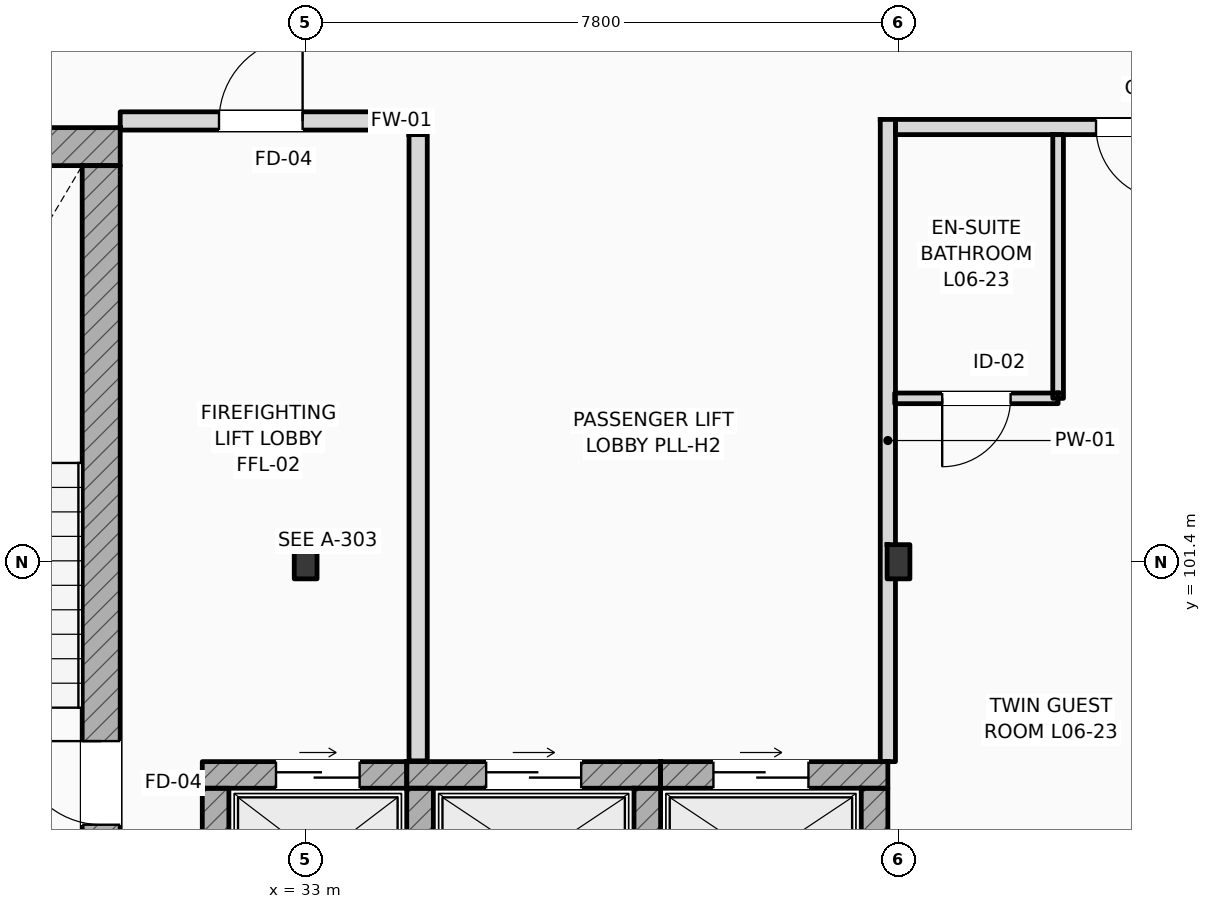
"""IFC4 building model, lengths in metres.
Left out: names, types, materials, properties, quantities, classifications, styles, units other than length and angle.
Written with IfcOpenShell. Run it as: python <this file> out.ifc"""

import sys

from ifc_helpers import new_model, si_unit, direction, frame, frame_2d, origin, origin_2d, place, context, subcontext, project, spatial, rectangle, i_section, extrude, element, fill, save


model = new_model("IFC4")
c1 = context("Model", 3, precision=1e-05, world=origin(), true_north=direction((0.0, 1.0)))
c2 = subcontext(c1, "Body", "Model", "MODEL_VIEW")
j1 = project(units=[si_unit("LENGTHUNIT", "METRE"), si_unit("PLANEANGLEUNIT", "RADIAN")], contexts=[c1])
p1 = place(None, origin())
s1 = spatial("IfcSite", under=j1, at=p1, CompositionType="ELEMENT")
p2 = place(p1, origin())
s2 = spatial("IfcBuilding", under=s1, at=p2, CompositionType="ELEMENT")
p3 = place(p2, frame((0.0, 0.0, 28.2)))
s3 = spatial("IfcBuildingStorey", under=s2, at=p3, CompositionType="ELEMENT", Elevation=28.2)
for number, where, z_axis, x_axis in (
    (1, (33.0, 101.4, 0.0), (0.0, 0.0, 1.0), (1.0, 0.0, 0.0)),
    (2, (40.8, 101.4, 0.0), (0.0, 0.0, 1.0), (1.0, 0.0, 0.0)),
):
    element("IfcColumn", number, at=place(p3, frame(where, z_axis=z_axis, x_axis=x_axis)), inside=s3, PredefinedType="COLUMN", context=c2, shape_type="SweptSolid", body=[
        extrude(i_section(OverallWidth=0.3, OverallDepth=0.45, WebThickness=0.014, FlangeThickness=0.026, FilletRadius=0.027, at=origin_2d()), origin(), (0.0, 0.0, 1.0), 3.6),
    ])
p4 = place(p3, frame((25.4, 106.862, 0.0), z_axis=(0.0, 0.0, 1.0), x_axis=(1.0, 0.0, 0.0)))
e3 = element("IfcWall", 3, at=p4, inside=s3, PredefinedType="SHEAR", context=c2, shape_type="SweptSolid", body=[
    extrude(rectangle(XDim=5.16, YDim=0.5, at=frame_2d((2.58, 0.0))), origin(), (0.0, 0.0, 1.0), 3.6),
])
p5 = place(p3, frame((30.31, 97.5, 0.0), z_axis=(0.0, 0.0, 1.0), x_axis=(0.0, 1.0, 0.0)))
e4 = element("IfcWall", 4, at=p5, inside=s3, PredefinedType="SHEAR", context=c2, shape_type="SweptSolid", body=[
    extrude(rectangle(XDim=9.112, YDim=0.5, at=frame_2d((4.556, 0.0))), origin(), (0.0, 0.0, 1.0), 3.6),
])
p6 = place(p5, frame((0.44, 0.0, 0.0)))
e5 = element("IfcOpeningElement", 5, at=p6, cuts=e4, PredefinedType="OPENING", context=c2, shape_type="SweptSolid", body=[
    extrude(rectangle(XDim=1.1, YDim=2.2, at=frame_2d((0.55, 1.1))), frame((0.0, 0.26, 0.0), z_axis=(0.0, -1.0, 0.0), x_axis=(1.0, 0.0, 0.0)), (0.0, 0.0, 1.0), 0.52),
])
p7 = place(p3, frame((31.64, 98.595, 0.0), z_axis=(0.0, 0.0, 1.0), x_axis=(1.0, 0.0, 0.0)))
e6 = element("IfcWall", 6, at=p7, inside=s3, PredefinedType="SHEAR", context=c2, shape_type="SweptSolid", body=[
    extrude(rectangle(XDim=2.69, YDim=0.35, at=frame_2d((1.345, 0.0))), origin(), (0.0, 0.0, 1.0), 3.36),
])
p8 = place(p7, frame((0.97, 0.0, 0.0)))
e7 = element("IfcOpeningElement", 7, at=p8, cuts=e6, PredefinedType="OPENING", context=c2, shape_type="SweptSolid", body=[
    extrude(rectangle(XDim=1.1, YDim=2.2, at=frame_2d((0.55, 1.1))), frame((0.0, 0.185, 0.0), z_axis=(0.0, -1.0, 0.0), x_axis=(1.0, 0.0, 0.0)), (0.0, 0.0, 1.0), 0.37),
])
p9 = place(p3, frame((31.815, 96.58, 0.0), z_axis=(0.0, 0.0, 1.0), x_axis=(0.0, 1.0, 0.0)))
e8 = element("IfcWall", 8, at=p9, inside=s3, PredefinedType="SHEAR", context=c2, shape_type="SweptSolid", body=[
    extrude(rectangle(XDim=1.84, YDim=0.35, at=frame_2d((0.92, 0.0))), origin(), (0.0, 0.0, 1.0), 3.36),
])
p10 = place(p3, frame((34.33, 98.595, 0.0), z_axis=(0.0, 0.0, 1.0), x_axis=(1.0, 0.0, 0.0)))
e9 = element("IfcWall", 9, at=p10, inside=s3, PredefinedType="SHEAR", context=c2, shape_type="SweptSolid", body=[
    extrude(rectangle(XDim=3.34, YDim=0.35, at=frame_2d((1.67, 0.0))), origin(), (0.0, 0.0, 1.0), 3.36),
])
p11 = place(p10, frame((1.045, 0.0, 0.0)))
e10 = element("IfcOpeningElement", 10, at=p11, cuts=e9, PredefinedType="OPENING", context=c2, shape_type="SweptSolid", body=[
    extrude(rectangle(XDim=1.25, YDim=2.25, at=frame_2d((0.625, 1.125))), frame((0.0, 0.185, 0.0), z_axis=(0.0, -1.0, 0.0), x_axis=(1.0, 0.0, 0.0)), (0.0, 0.0, 1.0), 0.37),
])
for number, where, z_axis, x_axis in (
    (11, (34.505, 96.58, 0.0), (0.0, 0.0, 1.0), (0.0, 1.0, 0.0)),
    (12, (37.495, 96.58, 0.0), (0.0, 0.0, 1.0), (0.0, 1.0, 0.0)),
):
    element("IfcWall", number, at=place(p3, frame(where, z_axis=z_axis, x_axis=x_axis)), inside=s3, PredefinedType="SHEAR", context=c2, shape_type="SweptSolid", body=[
        extrude(rectangle(XDim=1.84, YDim=0.35, at=frame_2d((0.92, 0.0))), origin(), (0.0, 0.0, 1.0), 3.36),
    ])
p12 = place(p3, frame((37.67, 98.595, 0.0), z_axis=(0.0, 0.0, 1.0), x_axis=(1.0, 0.0, 0.0)))
e13 = element("IfcWall", 13, at=p12, inside=s3, PredefinedType="SHEAR", context=c2, shape_type="SweptSolid", body=[
    extrude(rectangle(XDim=2.99, YDim=0.35, at=frame_2d((1.495, 0.0))), origin(), (0.0, 0.0, 1.0), 3.36),
])
p13 = place(p12, frame((0.695, 0.0, 0.0)))
e14 = element("IfcOpeningElement", 14, at=p13, cuts=e13, PredefinedType="OPENING", context=c2, shape_type="SweptSolid", body=[
    extrude(rectangle(XDim=1.25, YDim=2.25, at=frame_2d((0.625, 1.125))), frame((0.0, 0.185, 0.0), z_axis=(0.0, -1.0, 0.0), x_axis=(1.0, 0.0, 0.0)), (0.0, 0.0, 1.0), 0.37),
])
p14 = place(p3, frame((40.485, 96.58, 0.0), z_axis=(0.0, 0.0, 1.0), x_axis=(0.0, 1.0, 0.0)))
e15 = element("IfcWall", 15, at=p14, inside=s3, PredefinedType="SHEAR", context=c2, shape_type="SweptSolid", body=[
    extrude(rectangle(XDim=1.84, YDim=0.35, at=frame_2d((0.92, 0.0))), origin(), (0.0, 0.0, 1.0), 2.99),
])
p15 = place(p3, frame((34.48, 98.78, 0.0), z_axis=(0.0, 0.0, 1.0), x_axis=(0.0, 1.0, 0.0)))
e16 = element("IfcWall", 16, at=p15, inside=s3, PredefinedType="STANDARD", context=c2, shape_type="SweptSolid", body=[
    extrude(rectangle(XDim=8.24, YDim=0.24, at=frame_2d((4.12, 0.0))), origin(), (0.0, 0.0, 1.0), 3.36),
])
p16 = place(p3, frame((30.56, 107.2, 0.0), z_axis=(0.0, 0.0, 1.0), x_axis=(1.0, 0.0, 0.0)))
e17 = element("IfcWall", 17, at=p16, inside=s3, PredefinedType="STANDARD", context=c2, shape_type="SweptSolid", body=[
    extrude(rectangle(XDim=4.1, YDim=0.24, at=frame_2d((2.05, 0.0))), origin(), (0.0, 0.0, 1.0), 3.36),
])
p17 = place(p16, frame((1.3, 0.0, 0.0)))
e18 = element("IfcOpeningElement", 18, at=p17, cuts=e17, PredefinedType="OPENING", context=c2, shape_type="SweptSolid", body=[
    extrude(rectangle(XDim=1.1, YDim=2.2, at=frame_2d((0.55, 1.1))), frame((0.0, 0.13, 0.0), z_axis=(0.0, -1.0, 0.0), x_axis=(1.0, 0.0, 0.0)), (0.0, 0.0, 1.0), 0.26),
])
p18 = place(p3, frame((40.76, 107.12, 0.0), z_axis=(0.0, 0.0, 1.0), x_axis=(1.0, 0.0, 0.0)))
e19 = element("IfcWall", 19, at=p18, inside=s3, PredefinedType="PARTITIONING", context=c2, shape_type="SweptSolid", body=[
    extrude(rectangle(XDim=23.44, YDim=0.2, at=frame_2d((11.72, 0.0))), origin(), (0.0, 0.0, 1.0), 3.36),
])
p19 = place(p18, frame((2.639, 0.0, 0.0)))
e20 = element("IfcOpeningElement", 20, at=p19, cuts=e19, PredefinedType="OPENING", context=c2, shape_type="SweptSolid", body=[
    extrude(rectangle(XDim=0.96, YDim=2.2, at=frame_2d((0.48, 1.1))), frame((0.0, 0.11, 0.0), z_axis=(0.0, -1.0, 0.0), x_axis=(1.0, 0.0, 0.0)), (0.0, 0.0, 1.0), 0.22),
])
p20 = place(p18, frame((4.348, 0.0, 0.0)))
e21 = element("IfcOpeningElement", 21, at=p20, cuts=e19, PredefinedType="OPENING", context=c2, shape_type="SweptSolid", body=[
    extrude(rectangle(XDim=0.96, YDim=2.2, at=frame_2d((0.48, 1.1))), frame((0.0, 0.11, 0.0), z_axis=(0.0, -1.0, 0.0), x_axis=(1.0, 0.0, 0.0)), (0.0, 0.0, 1.0), 0.22),
])
p21 = place(p18, frame((10.406, 0.0, 0.0)))
e22 = element("IfcOpeningElement", 22, at=p21, cuts=e19, PredefinedType="OPENING", context=c2, shape_type="SweptSolid", body=[
    extrude(rectangle(XDim=0.96, YDim=2.2, at=frame_2d((0.48, 1.1))), frame((0.0, 0.11, 0.0), z_axis=(0.0, -1.0, 0.0), x_axis=(1.0, 0.0, 0.0)), (0.0, 0.0, 1.0), 0.22),
])
p22 = place(p18, frame((12.164, 0.0, 0.0)))
e23 = element("IfcOpeningElement", 23, at=p22, cuts=e19, PredefinedType="OPENING", context=c2, shape_type="SweptSolid", body=[
    extrude(rectangle(XDim=0.96, YDim=2.2, at=frame_2d((0.48, 1.1))), frame((0.0, 0.11, 0.0), z_axis=(0.0, -1.0, 0.0), x_axis=(1.0, 0.0, 0.0)), (0.0, 0.0, 1.0), 0.22),
])
p23 = place(p18, frame((18.223, 0.0, 0.0)))
e24 = element("IfcOpeningElement", 24, at=p23, cuts=e19, PredefinedType="OPENING", context=c2, shape_type="SweptSolid", body=[
    extrude(rectangle(XDim=0.96, YDim=2.2, at=frame_2d((0.48, 1.1))), frame((0.0, 0.11, 0.0), z_axis=(0.0, -1.0, 0.0), x_axis=(1.0, 0.0, 0.0)), (0.0, 0.0, 1.0), 0.22),
])
p24 = place(p18, frame((20.031, 0.0, 0.0)))
e25 = element("IfcOpeningElement", 25, at=p24, cuts=e19, PredefinedType="OPENING", context=c2, shape_type="SweptSolid", body=[
    extrude(rectangle(XDim=0.96, YDim=2.2, at=frame_2d((0.48, 1.1))), frame((0.0, 0.11, 0.0), z_axis=(0.0, -1.0, 0.0), x_axis=(1.0, 0.0, 0.0)), (0.0, 0.0, 1.0), 0.22),
])
p25 = place(p3, frame((40.66, 98.77, 0.0), z_axis=(0.0, 0.0, 1.0), x_axis=(0.0, 1.0, 0.0)))
e26 = element("IfcWall", 26, at=p25, inside=s3, PredefinedType="PARTITIONING", context=c2, shape_type="SweptSolid", body=[
    extrude(rectangle(XDim=8.45, YDim=0.2, at=frame_2d((4.225, 0.0))), origin(), (0.0, 0.0, 1.0), 2.99),
])
p26 = place(p3, frame((42.9, 103.55, 0.0), z_axis=(0.0, 0.0, 1.0), x_axis=(0.0, 1.0, 0.0)))
e27 = element("IfcWall", 27, at=p26, inside=s3, PredefinedType="PARTITIONING", context=c2, shape_type="SweptSolid", body=[
    extrude(rectangle(XDim=3.47, YDim=0.14, at=frame_2d((1.735, 0.0))), origin(), (0.0, 0.0, 1.0), 3.36),
])
p27 = place(p3, frame((40.75, 103.55, 0.0), z_axis=(0.0, 0.0, 1.0), x_axis=(1.0, 0.0, 0.0)))
e28 = element("IfcWall", 28, at=p27, inside=s3, PredefinedType="PARTITIONING", context=c2, shape_type="SweptSolid", body=[
    extrude(rectangle(XDim=2.15, YDim=0.14, at=frame_2d((1.075, 0.0))), origin(), (0.0, 0.0, 1.0), 3.36),
])
p28 = place(p27, frame((0.625, 0.0, 0.0)))
e29 = element("IfcOpeningElement", 29, at=p28, cuts=e28, PredefinedType="OPENING", context=c2, shape_type="SweptSolid", body=[
    extrude(rectangle(XDim=0.9, YDim=2.1, at=frame_2d((0.45, 1.05))), frame((0.0, 0.08, 0.0), z_axis=(0.0, -1.0, 0.0), x_axis=(1.0, 0.0, 0.0)), (0.0, 0.0, 1.0), 0.16),
])
p29 = place(p6, origin())
e30 = element("IfcDoor", 30, at=p29, inside=s3, OperationType="SINGLE_SWING_RIGHT", PredefinedType="DOOR", context=c2, shape_type="SweptSolid", body=[
    extrude(rectangle(XDim=1.1, YDim=2.2, at=frame_2d((0.55, 1.1))), frame((0.0, 0.025, 0.0), z_axis=(0.0, -1.0, 0.0), x_axis=(1.0, 0.0, 0.0)), (0.0, 0.0, 1.0), 0.05),
])
fill(e5, e30)
p30 = place(p8, origin())
e31 = element("IfcDoor", 31, at=p30, inside=s3, OperationType="SLIDING_TO_LEFT", PredefinedType="DOOR", context=c2, shape_type="SweptSolid", body=[
    extrude(rectangle(XDim=1.1, YDim=2.2, at=frame_2d((0.55, 1.1))), frame((0.0, 0.025, 0.0), z_axis=(0.0, -1.0, 0.0), x_axis=(1.0, 0.0, 0.0)), (0.0, 0.0, 1.0), 0.05),
])
fill(e7, e31)
p31 = place(p11, origin())
e32 = element("IfcDoor", 32, at=p31, inside=s3, OperationType="SLIDING_TO_LEFT", PredefinedType="DOOR", context=c2, shape_type="SweptSolid", body=[
    extrude(rectangle(XDim=1.25, YDim=2.25, at=frame_2d((0.625, 1.125))), frame((0.0, 0.025, 0.0), z_axis=(0.0, -1.0, 0.0), x_axis=(1.0, 0.0, 0.0)), (0.0, 0.0, 1.0), 0.05),
])
fill(e10, e32)
p32 = place(p13, origin())
e33 = element("IfcDoor", 33, at=p32, inside=s3, OperationType="SLIDING_TO_LEFT", PredefinedType="DOOR", context=c2, shape_type="SweptSolid", body=[
    extrude(rectangle(XDim=1.25, YDim=2.25, at=frame_2d((0.625, 1.125))), frame((0.0, 0.025, 0.0), z_axis=(0.0, -1.0, 0.0), x_axis=(1.0, 0.0, 0.0)), (0.0, 0.0, 1.0), 0.05),
])
fill(e14, e33)
p33 = place(p17, origin())
e34 = element("IfcDoor", 34, at=p33, inside=s3, OperationType="SINGLE_SWING_RIGHT", PredefinedType="DOOR", context=c2, shape_type="SweptSolid", body=[
    extrude(rectangle(XDim=1.1, YDim=2.2, at=frame_2d((0.55, 1.1))), frame((0.0, 0.025, 0.0), z_axis=(0.0, -1.0, 0.0), x_axis=(1.0, 0.0, 0.0)), (0.0, 0.0, 1.0), 0.05),
])
fill(e18, e34)
p34 = place(p19, frame((0.96, 0.0, 0.0), z_axis=(0.0, 0.0, 1.0), x_axis=(-1.0, 0.0, 0.0)))
e35 = element("IfcDoor", 35, at=p34, inside=s3, OperationType="SINGLE_SWING_RIGHT", PredefinedType="DOOR", context=c2, shape_type="SweptSolid", body=[
    extrude(rectangle(XDim=0.96, YDim=2.2, at=frame_2d((0.48, 1.1))), frame((0.0, 0.025, 0.0), z_axis=(0.0, -1.0, 0.0), x_axis=(1.0, 0.0, 0.0)), (0.0, 0.0, 1.0), 0.05),
])
fill(e20, e35)
p35 = place(p28, frame((0.9, 0.0, 0.0), z_axis=(0.0, 0.0, 1.0), x_axis=(-1.0, 0.0, 0.0)))
e36 = element("IfcDoor", 36, at=p35, inside=s3, OperationType="SINGLE_SWING_LEFT", PredefinedType="DOOR", context=c2, shape_type="SweptSolid", body=[
    extrude(rectangle(XDim=0.9, YDim=2.1, at=frame_2d((0.45, 1.05))), frame((0.0, 0.025, 0.0), z_axis=(0.0, -1.0, 0.0), x_axis=(1.0, 0.0, 0.0)), (0.0, 0.0, 1.0), 0.05),
])
fill(e29, e36)
save(model, sys.argv[1])
